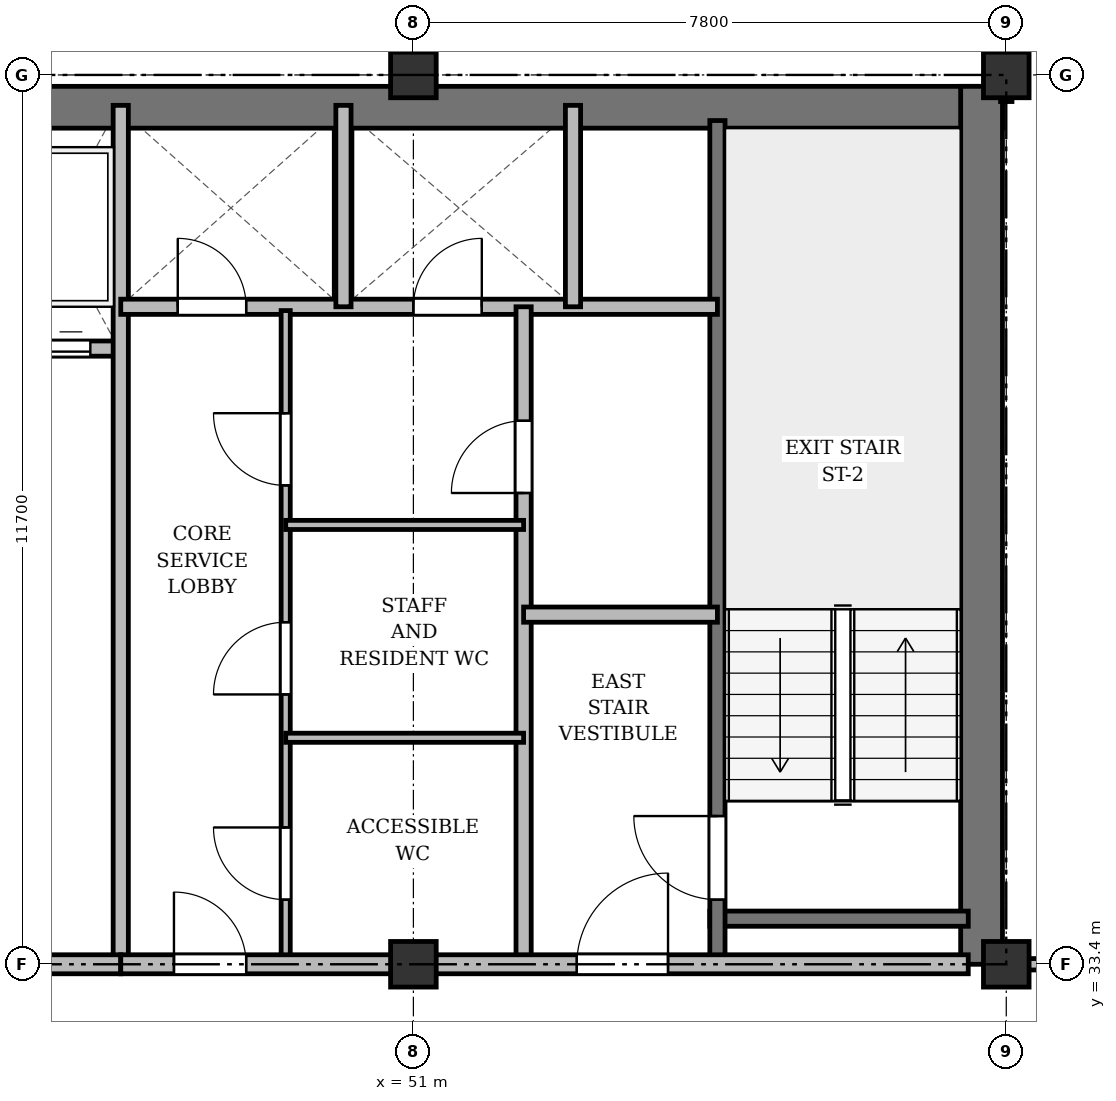
"""IFC4 building model, lengths in metres.
Left out: names, types, materials, properties, quantities, classifications, styles, units other than length and angle.
Written with IfcOpenShell. Run it as: python <this file> out.ifc"""

import sys

from ifc_helpers import new_model, si_unit, direction, frame, frame_2d, origin, origin_2d, place, context, subcontext, project, spatial, rectangle, extrude, source, transform, mapped, element, fill, save


model = new_model("IFC4")
c1 = context("Model", 3, precision=1e-05, world=origin(), true_north=direction((0.0, 1.0)))
c2 = subcontext(c1, "Body", "Model", "MODEL_VIEW")
j1 = project(units=[si_unit("LENGTHUNIT", "METRE"), si_unit("PLANEANGLEUNIT", "RADIAN")], contexts=[c1])
p1 = place(None, origin())
s1 = spatial("IfcSite", under=j1, at=p1, CompositionType="ELEMENT")
p2 = place(p1, origin())
s2 = spatial("IfcBuilding", under=s1, at=p2, CompositionType="ELEMENT")
p3 = place(p2, frame((0.0, 0.0, 288.3)))
s3 = spatial("IfcBuildingStorey", under=s2, at=p3, CompositionType="ELEMENT", Elevation=288.3)
m1 = source(origin(), c2, "Body", "SweptSolid", [
    extrude(rectangle(XDim=0.6, YDim=0.6, at=origin_2d()), origin(), (0.0, 0.0, 1.0), 3.6),
])
for number, where, z_axis, x_axis in (
    (1, (51.0, 33.4, 0.0), (0.0, 0.0, 1.0), (1.0, 0.0, 0.0)),
    (2, (51.0, 45.1, 0.0), (0.0, 0.0, 1.0), (1.0, 0.0, 0.0)),
    (3, (58.8, 33.4, 0.0), (0.0, 0.0, 1.0), (1.0, 0.0, 0.0)),
    (4, (58.8, 45.1, 0.0), (0.0, 0.0, 1.0), (1.0, 0.0, 0.0)),
):
    element("IfcColumn", number, at=place(p3, frame(where, z_axis=z_axis, x_axis=x_axis)), inside=s3, PredefinedType="COLUMN", context=c2, shape_type="MappedRepresentation", body=[
        mapped(m1, transform((0.0, 0.0, 0.0), x_axis=(1.0, 0.0, 0.0), y_axis=(0.0, 1.0, 0.0), z_axis=(0.0, 0.0, 1.0), scale=1.0)),
    ])
p4 = place(p3, frame((15.65, 44.675, 0.0), z_axis=(0.0, 0.0, 1.0), x_axis=(1.0, 0.0, 0.0)))
e5 = element("IfcWall", 5, at=p4, inside=s3, PredefinedType="SHEAR", context=c2, shape_type="SweptSolid", body=[
    extrude(rectangle(XDim=43.1, YDim=0.55, at=frame_2d((21.55, 0.0))), origin(), (0.0, 0.0, 1.0), 3.37),
])
p5 = place(p3, frame((58.475, 33.4, 0.0), z_axis=(0.0, 0.0, 1.0), x_axis=(0.0, 1.0, 0.0)))
e6 = element("IfcWall", 6, at=p5, inside=s3, PredefinedType="SHEAR", context=c2, shape_type="SweptSolid", body=[
    extrude(rectangle(XDim=11.55, YDim=0.55, at=frame_2d((5.775, 0.0))), origin(), (0.0, 0.0, 1.0), 3.37),
])
p6 = place(p3, frame((54.9, 34.0, 0.0), z_axis=(0.0, 0.0, 1.0), x_axis=(1.0, 0.0, 0.0)))
e7 = element("IfcWall", 7, at=p6, inside=s3, PredefinedType="SHEAR", context=c2, shape_type="SweptSolid", body=[
    extrude(rectangle(XDim=3.4, YDim=0.2, at=frame_2d((1.7, 0.0))), origin(), (0.0, 0.0, 1.0), 3.37),
])
p7 = place(p3, frame((55.0, 33.4, 0.0), z_axis=(0.0, 0.0, 1.0), x_axis=(0.0, 1.0, 0.0)))
e8 = element("IfcWall", 8, at=p7, inside=s3, PredefinedType="SHEAR", context=c2, shape_type="SweptSolid", body=[
    extrude(rectangle(XDim=11.1, YDim=0.2, at=frame_2d((5.55, 0.0))), origin(), (0.0, 0.0, 1.0), 3.37),
])
p8 = place(p7, frame((0.85, 0.0, 0.0)))
e9 = element("IfcOpeningElement", 9, at=p8, cuts=e8, PredefinedType="OPENING", context=c2, shape_type="SweptSolid", body=[
    extrude(rectangle(XDim=1.1, YDim=2.15, at=frame_2d((0.55, 1.075))), frame((0.0, 0.11, 0.0), z_axis=(0.0, -1.0, 0.0), x_axis=(1.0, 0.0, 0.0)), (0.0, 0.0, 1.0), 0.22),
])
p9 = place(p3, frame((40.25, 41.5, 0.0), z_axis=(0.0, 0.0, 1.0), x_axis=(1.0, 0.0, 0.0)))
e10 = element("IfcWall", 10, at=p9, inside=s3, PredefinedType="SOLIDWALL", context=c2, shape_type="SweptSolid", body=[
    extrude(rectangle(XDim=6.9, YDim=0.2, at=frame_2d((3.45, 0.0))), origin(), (0.0, 0.0, 1.0), 3.37),
])
p10 = place(p9, frame((0.35, 0.0, 0.0)))
e11 = element("IfcOpeningElement", 11, at=p10, cuts=e10, PredefinedType="OPENING", context=c2, shape_type="SweptSolid", body=[
    extrude(rectangle(XDim=1.05, YDim=2.15, at=frame_2d((0.525, 1.075))), frame((0.0, 0.11, 0.0), z_axis=(0.0, -1.0, 0.0), x_axis=(1.0, 0.0, 0.0)), (0.0, 0.0, 1.0), 0.22),
])
p11 = place(p9, frame((2.05, 0.0, 0.0)))
e12 = element("IfcOpeningElement", 12, at=p11, cuts=e10, PredefinedType="OPENING", context=c2, shape_type="SweptSolid", body=[
    extrude(rectangle(XDim=1.05, YDim=2.15, at=frame_2d((0.525, 1.075))), frame((0.0, 0.11, 0.0), z_axis=(0.0, -1.0, 0.0), x_axis=(1.0, 0.0, 0.0)), (0.0, 0.0, 1.0), 0.22),
])
p12 = place(p9, frame((3.75, 0.0, 0.0)))
e13 = element("IfcOpeningElement", 13, at=p12, cuts=e10, PredefinedType="OPENING", context=c2, shape_type="SweptSolid", body=[
    extrude(rectangle(XDim=1.05, YDim=2.15, at=frame_2d((0.525, 1.075))), frame((0.0, 0.11, 0.0), z_axis=(0.0, -1.0, 0.0), x_axis=(1.0, 0.0, 0.0)), (0.0, 0.0, 1.0), 0.22),
])
p13 = place(p9, frame((5.45, 0.0, 0.0)))
e14 = element("IfcOpeningElement", 14, at=p13, cuts=e10, PredefinedType="OPENING", context=c2, shape_type="SweptSolid", body=[
    extrude(rectangle(XDim=1.05, YDim=2.15, at=frame_2d((0.525, 1.075))), frame((0.0, 0.11, 0.0), z_axis=(0.0, -1.0, 0.0), x_axis=(1.0, 0.0, 0.0)), (0.0, 0.0, 1.0), 0.22),
])
p14 = place(p3, frame((47.15, 33.4, 0.0), z_axis=(0.0, 0.0, 1.0), x_axis=(0.0, 1.0, 0.0)))
e15 = element("IfcWall", 15, at=p14, inside=s3, PredefinedType="SOLIDWALL", context=c2, shape_type="SweptSolid", body=[
    extrude(rectangle(XDim=11.3, YDim=0.2, at=frame_2d((5.65, 0.0))), origin(), (0.0, 0.0, 1.0), 2.92),
])
p15 = place(p3, frame((40.1, 33.4, 0.0), z_axis=(0.0, 0.0, 1.0), x_axis=(1.0, 0.0, 0.0)))
e16 = element("IfcWall", 16, at=p15, inside=s3, PredefinedType="PARTITIONING", context=c2, shape_type="SweptSolid", body=[
    extrude(rectangle(XDim=7.05, YDim=0.25, at=frame_2d((3.525, 0.0))), origin(), (0.0, 0.0, 1.0), 2.92),
])
p16 = place(p15, frame((0.65, 0.0, 0.0)))
e17 = element("IfcOpeningElement", 17, at=p16, cuts=e16, PredefinedType="OPENING", context=c2, shape_type="SweptSolid", body=[
    extrude(rectangle(XDim=1.6, YDim=2.2, at=frame_2d((0.8, 1.1))), frame((0.0, 0.135, 0.0), z_axis=(0.0, -1.0, 0.0), x_axis=(1.0, 0.0, 0.0)), (0.0, 0.0, 1.0), 0.27),
])
p17 = place(p3, frame((47.15, 42.05, 0.0), z_axis=(0.0, 0.0, 1.0), x_axis=(1.0, 0.0, 0.0)))
e18 = element("IfcWall", 18, at=p17, inside=s3, PredefinedType="SOLIDWALL", context=c2, shape_type="SweptSolid", body=[
    extrude(rectangle(XDim=7.85, YDim=0.2, at=frame_2d((3.925, 0.0))), origin(), (0.0, 0.0, 1.0), 2.87),
])
p18 = place(p17, frame((0.75, 0.0, 0.0)))
e19 = element("IfcOpeningElement", 19, at=p18, cuts=e18, PredefinedType="OPENING", context=c2, shape_type="SweptSolid", body=[
    extrude(rectangle(XDim=0.9, YDim=2.1, at=frame_2d((0.45, 1.05))), frame((0.0, 0.11, 0.0), z_axis=(0.0, -1.0, 0.0), x_axis=(1.0, 0.0, 0.0)), (0.0, 0.0, 1.0), 0.22),
])
p19 = place(p17, frame((3.85, 0.0, 0.0)))
e20 = element("IfcOpeningElement", 20, at=p19, cuts=e18, PredefinedType="OPENING", context=c2, shape_type="SweptSolid", body=[
    extrude(rectangle(XDim=0.9, YDim=2.1, at=frame_2d((0.45, 1.05))), frame((0.0, 0.11, 0.0), z_axis=(0.0, -1.0, 0.0), x_axis=(1.0, 0.0, 0.0)), (0.0, 0.0, 1.0), 0.22),
])
for number, where, z_axis, x_axis in (
    (21, (50.08, 42.05, 0.0), (0.0, 0.0, 1.0), (0.0, 1.0, 0.0)),
    (22, (53.1, 42.05, 0.0), (0.0, 0.0, 1.0), (0.0, 1.0, 0.0)),
):
    element("IfcWall", number, at=place(p3, frame(where, z_axis=z_axis, x_axis=x_axis)), inside=s3, PredefinedType="SOLIDWALL", context=c2, shape_type="SweptSolid", body=[
        extrude(rectangle(XDim=2.65, YDim=0.2, at=frame_2d((1.325, 0.0))), origin(), (0.0, 0.0, 1.0), 3.37),
    ])
p20 = place(p3, frame((52.45, 33.4, 0.0), z_axis=(0.0, 0.0, 1.0), x_axis=(0.0, 1.0, 0.0)))
e23 = element("IfcWall", 23, at=p20, inside=s3, PredefinedType="PARTITIONING", context=c2, shape_type="SweptSolid", body=[
    extrude(rectangle(XDim=8.65, YDim=0.2, at=frame_2d((4.325, 0.0))), origin(), (0.0, 0.0, 1.0), 2.92),
])
p21 = place(p20, frame((6.2, 0.0, 0.0)))
e24 = element("IfcOpeningElement", 24, at=p21, cuts=e23, PredefinedType="OPENING", context=c2, shape_type="SweptSolid", body=[
    extrude(rectangle(XDim=0.95, YDim=2.15, at=frame_2d((0.475, 1.075))), frame((0.0, 0.11, 0.0), z_axis=(0.0, -1.0, 0.0), x_axis=(1.0, 0.0, 0.0)), (0.0, 0.0, 1.0), 0.22),
])
p22 = place(p3, frame((52.45, 38.0, 0.0), z_axis=(0.0, 0.0, 1.0), x_axis=(1.0, 0.0, 0.0)))
e25 = element("IfcWall", 25, at=p22, inside=s3, PredefinedType="PARTITIONING", context=c2, shape_type="SweptSolid", body=[
    extrude(rectangle(XDim=2.55, YDim=0.2, at=frame_2d((1.275, 0.0))), origin(), (0.0, 0.0, 1.0), 3.37),
])
p23 = place(p3, frame((49.32, 33.4, 0.0), z_axis=(0.0, 0.0, 1.0), x_axis=(0.0, 1.0, 0.0)))
e26 = element("IfcWall", 26, at=p23, inside=s3, PredefinedType="PARTITIONING", context=c2, shape_type="SweptSolid", body=[
    extrude(rectangle(XDim=8.6, YDim=0.12, at=frame_2d((4.3, 0.0))), origin(), (0.0, 0.0, 1.0), 2.92),
])
p24 = place(p23, frame((0.85, 0.0, 0.0)))
e27 = element("IfcOpeningElement", 27, at=p24, cuts=e26, PredefinedType="OPENING", context=c2, shape_type="SweptSolid", body=[
    extrude(rectangle(XDim=0.95, YDim=2.15, at=frame_2d((0.475, 1.075))), frame((0.0, 0.07, 0.0), z_axis=(0.0, -1.0, 0.0), x_axis=(1.0, 0.0, 0.0)), (0.0, 0.0, 1.0), 0.14),
])
p25 = place(p23, frame((3.55, 0.0, 0.0)))
e28 = element("IfcOpeningElement", 28, at=p25, cuts=e26, PredefinedType="OPENING", context=c2, shape_type="SweptSolid", body=[
    extrude(rectangle(XDim=0.95, YDim=2.15, at=frame_2d((0.475, 1.075))), frame((0.0, 0.07, 0.0), z_axis=(0.0, -1.0, 0.0), x_axis=(1.0, 0.0, 0.0)), (0.0, 0.0, 1.0), 0.14),
])
p26 = place(p23, frame((6.3, 0.0, 0.0)))
e29 = element("IfcOpeningElement", 29, at=p26, cuts=e26, PredefinedType="OPENING", context=c2, shape_type="SweptSolid", body=[
    extrude(rectangle(XDim=0.95, YDim=2.15, at=frame_2d((0.475, 1.075))), frame((0.0, 0.07, 0.0), z_axis=(0.0, -1.0, 0.0), x_axis=(1.0, 0.0, 0.0)), (0.0, 0.0, 1.0), 0.14),
])
for number, where, z_axis, x_axis in (
    (30, (49.32, 36.38, 0.0), (0.0, 0.0, 1.0), (1.0, 0.0, 0.0)),
    (31, (49.32, 39.18, 0.0), (0.0, 0.0, 1.0), (1.0, 0.0, 0.0)),
):
    element("IfcWall", number, at=place(p3, frame(where, z_axis=z_axis, x_axis=x_axis)), inside=s3, PredefinedType="PARTITIONING", context=c2, shape_type="SweptSolid", body=[
        extrude(rectangle(XDim=3.13, YDim=0.12, at=frame_2d((1.565, 0.0))), origin(), (0.0, 0.0, 1.0), 2.87),
    ])
p27 = place(p3, frame((47.15, 33.4, 0.0), z_axis=(0.0, 0.0, 1.0), x_axis=(1.0, 0.0, 0.0)))
e32 = element("IfcWall", 32, at=p27, inside=s3, PredefinedType="PARTITIONING", context=c2, shape_type="SweptSolid", body=[
    extrude(rectangle(XDim=11.15, YDim=0.25, at=frame_2d((5.575, 0.0))), origin(), (0.0, 0.0, 1.0), 2.92),
])
p28 = place(p27, frame((0.7, 0.0, 0.0)))
e33 = element("IfcOpeningElement", 33, at=p28, cuts=e32, PredefinedType="OPENING", context=c2, shape_type="SweptSolid", body=[
    extrude(rectangle(XDim=0.95, YDim=2.15, at=frame_2d((0.475, 1.075))), frame((0.0, 0.135, 0.0), z_axis=(0.0, -1.0, 0.0), x_axis=(1.0, 0.0, 0.0)), (0.0, 0.0, 1.0), 0.27),
])
p29 = place(p27, frame((6.0, 0.0, 0.0)))
e34 = element("IfcOpeningElement", 34, at=p29, cuts=e32, PredefinedType="OPENING", context=c2, shape_type="SweptSolid", body=[
    extrude(rectangle(XDim=1.2, YDim=2.15, at=frame_2d((0.6, 1.075))), frame((0.0, 0.135, 0.0), z_axis=(0.0, -1.0, 0.0), x_axis=(1.0, 0.0, 0.0)), (0.0, 0.0, 1.0), 0.27),
])
p30 = place(p3, frame((58.8, 33.4, 0.0), z_axis=(0.0, 0.0, 1.0), x_axis=(1.0, 0.0, 0.0)))
e35 = element("IfcWall", 35, at=p30, inside=s3, PredefinedType="PARTITIONING", context=c2, shape_type="SweptSolid", body=[
    extrude(rectangle(XDim=7.15, YDim=0.15, at=frame_2d((3.575, 0.0))), origin(), (0.0, 0.0, 1.0), 2.92),
])
p31 = place(p30, frame((3.0, 0.0, 0.0)))
e36 = element("IfcOpeningElement", 36, at=p31, cuts=e35, PredefinedType="OPENING", context=c2, shape_type="SweptSolid", body=[
    extrude(rectangle(XDim=0.95, YDim=2.15, at=frame_2d((0.475, 1.075))), frame((0.0, 0.085, 0.0), z_axis=(0.0, -1.0, 0.0), x_axis=(1.0, 0.0, 0.0)), (0.0, 0.0, 1.0), 0.17),
])
p32 = place(p3, frame((58.8, 44.75, 0.0), z_axis=(0.0, 0.0, 1.0), x_axis=(0.0, 1.0, 0.0)))
e37 = element("IfcWall", 37, at=p32, inside=s3, PredefinedType="PARTITIONING", context=c2, shape_type="SweptSolid", body=[
    extrude(rectangle(XDim=3.61, YDim=0.15, at=frame_2d((1.805, 0.0))), origin(), (0.0, 0.0, 1.0), 2.87),
])
p33 = place(p32, frame((1.1, 0.0, 0.0)))
e38 = element("IfcOpeningElement", 38, at=p33, cuts=e37, PredefinedType="OPENING", context=c2, shape_type="SweptSolid", body=[
    extrude(rectangle(XDim=0.95, YDim=2.15, at=frame_2d((0.475, 1.075))), frame((0.0, 0.085, 0.0), z_axis=(0.0, -1.0, 0.0), x_axis=(1.0, 0.0, 0.0)), (0.0, 0.0, 1.0), 0.17),
])
m2 = source(origin(), c2, "Body", "SweptSolid", [
    extrude(rectangle(XDim=1.1, YDim=2.15, at=frame_2d((0.55, 1.075))), frame((0.0, 0.025, 0.0), z_axis=(0.0, -1.0, 0.0), x_axis=(1.0, 0.0, 0.0)), (0.0, 0.0, 1.0), 0.05),
])
p34 = place(p8, origin())
e39 = element("IfcDoor", 39, at=p34, inside=s3, OperationType="SINGLE_SWING_RIGHT", PredefinedType="DOOR", context=c2, shape_type="MappedRepresentation", body=[
    mapped(m2, transform((0.0, 0.0, 0.0), x_axis=(1.0, 0.0, 0.0), y_axis=(0.0, 1.0, 0.0), z_axis=(0.0, 0.0, 1.0), scale=1.0)),
])
fill(e9, e39)
m3 = source(origin(), c2, "Body", "SweptSolid", [
    extrude(rectangle(XDim=1.05, YDim=2.15, at=frame_2d((0.525, 1.075))), frame((0.0, 0.025, 0.0), z_axis=(0.0, -1.0, 0.0), x_axis=(1.0, 0.0, 0.0)), (0.0, 0.0, 1.0), 0.05),
])
p35 = place(p13, origin())
e40 = element("IfcDoor", 40, at=p35, inside=s3, OperationType="DOUBLE_DOOR_SLIDING", PredefinedType="DOOR", context=c2, shape_type="MappedRepresentation", body=[
    mapped(m3, transform((0.0, 0.0, 0.0), x_axis=(1.0, 0.0, 0.0), y_axis=(0.0, 1.0, 0.0), z_axis=(0.0, 0.0, 1.0), scale=1.0)),
])
fill(e14, e40)
m4 = source(origin(), c2, "Body", "SweptSolid", [
    extrude(rectangle(XDim=0.9, YDim=2.1, at=frame_2d((0.45, 1.05))), frame((0.0, 0.025, 0.0), z_axis=(0.0, -1.0, 0.0), x_axis=(1.0, 0.0, 0.0)), (0.0, 0.0, 1.0), 0.05),
])
p36 = place(p18, origin())
e41 = element("IfcDoor", 41, at=p36, inside=s3, OperationType="SINGLE_SWING_LEFT", PredefinedType="DOOR", context=c2, shape_type="MappedRepresentation", body=[
    mapped(m4, transform((0.0, 0.0, 0.0), x_axis=(1.0, 0.0, 0.0), y_axis=(0.0, 1.0, 0.0), z_axis=(0.0, 0.0, 1.0), scale=1.0)),
])
fill(e19, e41)
p37 = place(p19, origin())
e42 = element("IfcDoor", 42, at=p37, inside=s3, OperationType="SINGLE_SWING_RIGHT", PredefinedType="DOOR", context=c2, shape_type="MappedRepresentation", body=[
    mapped(m4, transform((0.0, 0.0, 0.0), x_axis=(1.0, 0.0, 0.0), y_axis=(0.0, 1.0, 0.0), z_axis=(0.0, 0.0, 1.0), scale=1.0)),
])
fill(e20, e42)
m5 = source(origin(), c2, "Body", "SweptSolid", [
    extrude(rectangle(XDim=0.95, YDim=2.15, at=frame_2d((0.475, 1.075))), frame((0.0, 0.025, 0.0), z_axis=(0.0, -1.0, 0.0), x_axis=(1.0, 0.0, 0.0)), (0.0, 0.0, 1.0), 0.05),
])
p38 = place(p21, origin())
e43 = element("IfcDoor", 43, at=p38, inside=s3, OperationType="SINGLE_SWING_LEFT", PredefinedType="DOOR", context=c2, shape_type="MappedRepresentation", body=[
    mapped(m5, transform((0.0, 0.0, 0.0), x_axis=(1.0, 0.0, 0.0), y_axis=(0.0, 1.0, 0.0), z_axis=(0.0, 0.0, 1.0), scale=1.0)),
])
fill(e24, e43)
p39 = place(p24, origin())
e44 = element("IfcDoor", 44, at=p39, inside=s3, OperationType="SINGLE_SWING_RIGHT", PredefinedType="DOOR", context=c2, shape_type="MappedRepresentation", body=[
    mapped(m5, transform((0.0, 0.0, 0.0), x_axis=(1.0, 0.0, 0.0), y_axis=(0.0, 1.0, 0.0), z_axis=(0.0, 0.0, 1.0), scale=1.0)),
])
fill(e27, e44)
p40 = place(p25, origin())
e45 = element("IfcDoor", 45, at=p40, inside=s3, OperationType="SINGLE_SWING_LEFT", PredefinedType="DOOR", context=c2, shape_type="MappedRepresentation", body=[
    mapped(m5, transform((0.0, 0.0, 0.0), x_axis=(1.0, 0.0, 0.0), y_axis=(0.0, 1.0, 0.0), z_axis=(0.0, 0.0, 1.0), scale=1.0)),
])
fill(e28, e45)
p41 = place(p26, origin())
e46 = element("IfcDoor", 46, at=p41, inside=s3, OperationType="SINGLE_SWING_RIGHT", PredefinedType="DOOR", context=c2, shape_type="MappedRepresentation", body=[
    mapped(m5, transform((0.0, 0.0, 0.0), x_axis=(1.0, 0.0, 0.0), y_axis=(0.0, 1.0, 0.0), z_axis=(0.0, 0.0, 1.0), scale=1.0)),
])
fill(e29, e46)
p42 = place(p28, origin())
e47 = element("IfcDoor", 47, at=p42, inside=s3, OperationType="SINGLE_SWING_LEFT", PredefinedType="DOOR", context=c2, shape_type="MappedRepresentation", body=[
    mapped(m5, transform((0.0, 0.0, 0.0), x_axis=(1.0, 0.0, 0.0), y_axis=(0.0, 1.0, 0.0), z_axis=(0.0, 0.0, 1.0), scale=1.0)),
])
fill(e33, e47)
m6 = source(origin(), c2, "Body", "SweptSolid", [
    extrude(rectangle(XDim=1.2, YDim=2.15, at=frame_2d((0.6, 1.075))), frame((0.0, 0.025, 0.0), z_axis=(0.0, -1.0, 0.0), x_axis=(1.0, 0.0, 0.0)), (0.0, 0.0, 1.0), 0.05),
])
p43 = place(p29, origin())
e48 = element("IfcDoor", 48, at=p43, inside=s3, OperationType="SINGLE_SWING_RIGHT", PredefinedType="DOOR", context=c2, shape_type="MappedRepresentation", body=[
    mapped(m6, transform((0.0, 0.0, 0.0), x_axis=(1.0, 0.0, 0.0), y_axis=(0.0, 1.0, 0.0), z_axis=(0.0, 0.0, 1.0), scale=1.0)),
])
fill(e34, e48)
save(model, sys.argv[1])
